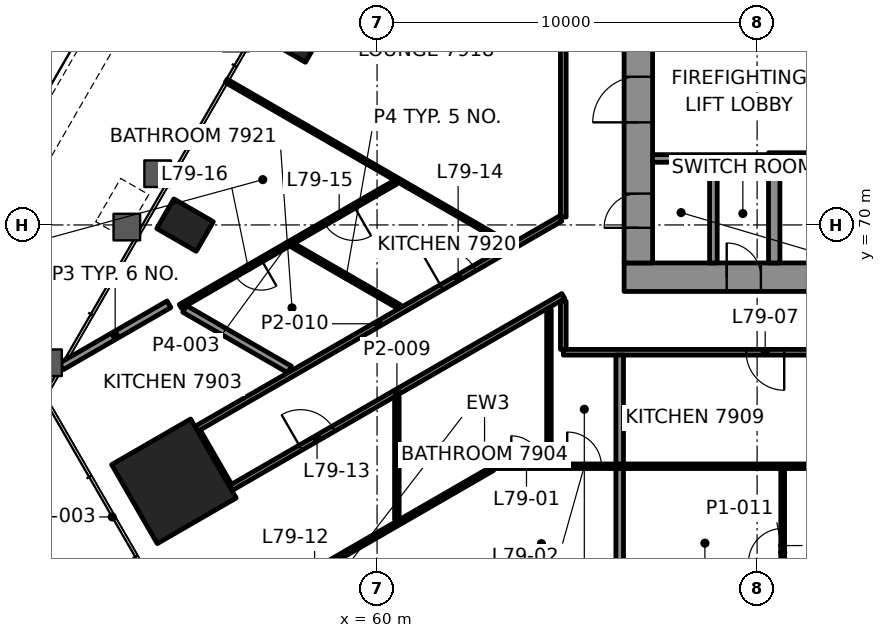
"""IFC4 building model, lengths in metres.
Left out: names, types, materials, properties, quantities, classifications, styles, units other than length and angle.
Written with IfcOpenShell. Run it as: python <this file> out.ifc"""

import sys

from ifc_helpers import new_model, si_unit, direction, frame, frame_2d, origin, origin_2d, place, context, subcontext, project, spatial, rectangle, hollow_rectangle, extrude, element, fill, save


model = new_model("IFC4")
c1 = context("Model", 3, precision=1e-05, world=origin(), true_north=direction((0.0, 1.0)))
c2 = subcontext(c1, "Body", "Model", "MODEL_VIEW")
j1 = project(units=[si_unit("LENGTHUNIT", "METRE"), si_unit("PLANEANGLEUNIT", "RADIAN")], contexts=[c1])
p1 = place(None, origin())
s1 = spatial("IfcSite", under=j1, at=p1, CompositionType="ELEMENT")
p2 = place(p1, origin())
s2 = spatial("IfcBuilding", under=s1, at=p2, CompositionType="ELEMENT")
p3 = place(p2, frame((0.0, 0.0, 323.1)))
s3 = spatial("IfcBuildingStorey", under=s2, at=p3, CompositionType="ELEMENT", Elevation=323.1)
p4 = place(p3, frame((54.655, 63.254, 0.0), z_axis=(0.0, 0.0, 1.0), x_axis=(0.5, -0.866025403784, 0.0)))
e1 = element("IfcColumn", 1, at=p4, inside=s3, PredefinedType="COLUMN", context=c2, shape_type="SweptSolid", body=[
    extrude(rectangle(XDim=2.4, YDim=2.4, at=origin_2d()), origin(), (0.0, 0.0, 1.0), 3.5),
])
for number, where, z_axis, x_axis in (
    (2, (57.819, 74.97, -0.0), (0.0, 0.0, 1.0), (-0.5, -0.866, 0.0)),
    (3, (54.948, 69.996, -0.0), (0.0, 0.0, 1.0), (-0.5, -0.866, 0.0)),
):
    element("IfcColumn", number, at=place(p3, frame(where, z_axis=z_axis, x_axis=x_axis)), inside=s3, PredefinedType="COLUMN", context=c2, shape_type="SweptSolid", body=[
        extrude(hollow_rectangle(XDim=0.9, YDim=1.2, WallThickness=0.06, at=origin_2d()), origin(), (0.0, 0.0, 1.0), 3.5),
    ])
p5 = place(p3, frame((66.5, 68.625, 0.0), z_axis=(0.0, 0.0, 1.0), x_axis=(1.0, 0.0, 0.0)))
e4 = element("IfcWall", 4, at=p5, inside=s3, PredefinedType="SHEAR", context=c2, shape_type="SweptSolid", body=[
    extrude(rectangle(XDim=17.0, YDim=0.75, at=frame_2d((8.5, 0.0))), origin(), (0.0, 0.0, 1.0), 3.2),
])
p6 = place(p5, frame((2.7, 0.0, 0.0)))
e5 = element("IfcOpeningElement", 5, at=p6, cuts=e4, PredefinedType="OPENING", context=c2, shape_type="SweptSolid", body=[
    extrude(rectangle(XDim=0.9, YDim=2.1, at=frame_2d((0.45, 1.05))), frame((0.0, 0.385, 0.0), z_axis=(0.0, -1.0, 0.0), x_axis=(1.0, 0.0, 0.0)), (0.0, 0.0, 1.0), 0.77),
])
p7 = place(p3, frame((66.875, 69.0, 0.0), z_axis=(0.0, 0.0, 1.0), x_axis=(0.0, 1.0, 0.0)))
e6 = element("IfcWall", 6, at=p7, inside=s3, PredefinedType="SHEAR", context=c2, shape_type="SweptSolid", body=[
    extrude(rectangle(XDim=12.0, YDim=0.75, at=frame_2d((6.0, 0.0))), origin(), (0.0, 0.0, 1.0), 3.2),
])
p8 = place(p7, frame((3.7, 0.0, 0.0)))
e7 = element("IfcOpeningElement", 7, at=p8, cuts=e6, PredefinedType="OPENING", context=c2, shape_type="SweptSolid", body=[
    extrude(rectangle(XDim=1.2, YDim=2.1, at=frame_2d((0.6, 1.05))), frame((0.0, 0.385, 0.0), z_axis=(0.0, -1.0, 0.0), x_axis=(1.0, 0.0, 0.0)), (0.0, 0.0, 1.0), 0.77),
])
p9 = place(p7, frame((0.925, 0.0, 0.0)))
e8 = element("IfcOpeningElement", 8, at=p9, cuts=e6, PredefinedType="OPENING", context=c2, shape_type="SweptSolid", body=[
    extrude(rectangle(XDim=0.9, YDim=2.1, at=frame_2d((0.45, 1.05))), frame((0.0, 0.385, 0.0), z_axis=(0.0, -1.0, 0.0), x_axis=(1.0, 0.0, 0.0)), (0.0, 0.0, 1.0), 0.77),
])
p10 = place(p3, frame((70.3, 71.75, 0.0), z_axis=(0.0, 0.0, 1.0), x_axis=(1.0, 0.0, 0.0)))
e9 = element("IfcWall", 9, at=p10, inside=s3, PredefinedType="SHEAR", context=c2, shape_type="SweptSolid", body=[
    extrude(rectangle(XDim=11.5, YDim=0.3, at=frame_2d((5.75, 0.0))), origin(), (0.0, 0.0, 1.0), 3.2),
])
p11 = place(p10, frame((1.0, 0.0, 0.0)))
e10 = element("IfcOpeningElement", 10, at=p11, cuts=e9, PredefinedType="OPENING", context=c2, shape_type="SweptSolid", body=[
    extrude(rectangle(XDim=1.1, YDim=2.1, at=frame_2d((0.55, 1.05))), frame((0.0, 0.16, 0.0), z_axis=(0.0, -1.0, 0.0), x_axis=(1.0, 0.0, 0.0)), (0.0, 0.0, 1.0), 0.32),
])
p12 = place(p10, frame((3.8, 0.0, 0.0)))
e11 = element("IfcOpeningElement", 11, at=p12, cuts=e9, PredefinedType="OPENING", context=c2, shape_type="SweptSolid", body=[
    extrude(rectangle(XDim=1.1, YDim=2.1, at=frame_2d((0.55, 1.05))), frame((0.0, 0.16, 0.0), z_axis=(0.0, -1.0, 0.0), x_axis=(1.0, 0.0, 0.0)), (0.0, 0.0, 1.0), 0.32),
])
p13 = place(p10, frame((6.6, 0.0, 0.0)))
e12 = element("IfcOpeningElement", 12, at=p13, cuts=e9, PredefinedType="OPENING", context=c2, shape_type="SweptSolid", body=[
    extrude(rectangle(XDim=1.1, YDim=2.1, at=frame_2d((0.55, 1.05))), frame((0.0, 0.16, 0.0), z_axis=(0.0, -1.0, 0.0), x_axis=(1.0, 0.0, 0.0)), (0.0, 0.0, 1.0), 0.32),
])
p14 = place(p10, frame((9.4, 0.0, 0.0)))
e13 = element("IfcOpeningElement", 13, at=p14, cuts=e9, PredefinedType="OPENING", context=c2, shape_type="SweptSolid", body=[
    extrude(rectangle(XDim=1.1, YDim=2.1, at=frame_2d((0.55, 1.05))), frame((0.0, 0.16, 0.0), z_axis=(0.0, -1.0, 0.0), x_axis=(1.0, 0.0, 0.0)), (0.0, 0.0, 1.0), 0.32),
])
p15 = place(p3, frame((70.45, 69.0, 0.0), z_axis=(0.0, 0.0, 1.0), x_axis=(0.0, 1.0, 0.0)))
e14 = element("IfcWall", 14, at=p15, inside=s3, PredefinedType="SHEAR", context=c2, shape_type="SweptSolid", body=[
    extrude(rectangle(XDim=2.6, YDim=0.3, at=frame_2d((1.3, 0.0))), origin(), (0.0, 0.0, 1.0), 3.2),
])
p16 = place(p3, frame((63.141, 63.65, 0.0), z_axis=(0.0, 0.0, 1.0), x_axis=(1.0, 0.0, 0.0)))
e15 = element("IfcWall", 15, at=p16, inside=s3, PredefinedType="PARTITIONING", context=c2, shape_type="SweptSolid", body=[
    extrude(rectangle(XDim=18.56, YDim=0.12, at=frame_2d((9.28, 0.0))), origin(), (0.0, 0.0, 1.0), 2.6),
])
p17 = place(p16, frame((0.391, 0.0, 0.0)))
e16 = element("IfcOpeningElement", 16, at=p17, cuts=e15, PredefinedType="OPENING", context=c2, shape_type="SweptSolid", body=[
    extrude(rectangle(XDim=0.8, YDim=2.1, at=frame_2d((0.4, 1.05))), frame((0.0, 0.07, 0.0), z_axis=(0.0, -1.0, 0.0), x_axis=(1.0, 0.0, 0.0)), (0.0, 0.0, 1.0), 0.14),
])
p18 = place(p16, frame((1.862, 0.0, 0.0)))
e17 = element("IfcOpeningElement", 17, at=p18, cuts=e15, PredefinedType="OPENING", context=c2, shape_type="SweptSolid", body=[
    extrude(rectangle(XDim=0.9, YDim=2.1, at=frame_2d((0.45, 1.05))), frame((0.0, 0.07, 0.0), z_axis=(0.0, -1.0, 0.0), x_axis=(1.0, 0.0, 0.0)), (0.0, 0.0, 1.0), 0.14),
])
p19 = place(p16, frame((8.768, 0.0, 0.0)))
e18 = element("IfcOpeningElement", 18, at=p19, cuts=e15, PredefinedType="OPENING", context=c2, shape_type="SweptSolid", body=[
    extrude(rectangle(XDim=0.9, YDim=2.1, at=frame_2d((0.45, 1.05))), frame((0.0, 0.07, 0.0), z_axis=(0.0, -1.0, 0.0), x_axis=(1.0, 0.0, 0.0)), (0.0, 0.0, 1.0), 0.14),
])
p20 = place(p16, frame((12.188, 0.0, 0.0)))
e19 = element("IfcOpeningElement", 19, at=p20, cuts=e15, PredefinedType="OPENING", context=c2, shape_type="SweptSolid", body=[
    extrude(rectangle(XDim=0.8, YDim=2.1, at=frame_2d((0.4, 1.05))), frame((0.0, 0.07, 0.0), z_axis=(0.0, -1.0, 0.0), x_axis=(1.0, 0.0, 0.0)), (0.0, 0.0, 1.0), 0.14),
])
p21 = place(p16, frame((16.514, 0.0, 0.0)))
e20 = element("IfcOpeningElement", 20, at=p21, cuts=e15, PredefinedType="OPENING", context=c2, shape_type="SweptSolid", body=[
    extrude(rectangle(XDim=0.9, YDim=2.1, at=frame_2d((0.45, 1.05))), frame((0.0, 0.07, 0.0), z_axis=(0.0, -1.0, 0.0), x_axis=(1.0, 0.0, 0.0)), (0.0, 0.0, 1.0), 0.14),
])
p22 = place(p3, frame((85.099, 66.65, 0.0), z_axis=(0.0, 0.0, 1.0), x_axis=(-1.0, 0.0, 0.0)))
e21 = element("IfcWall", 21, at=p22, inside=s3, PredefinedType="PARTITIONING", context=c2, shape_type="SweptSolid", body=[
    extrude(rectangle(XDim=20.199, YDim=0.15, at=frame_2d((10.1, 0.0))), origin(), (0.0, 0.0, 1.0), 2.6),
])
p23 = place(p22, frame((1.351, 0.0, 0.0)))
e22 = element("IfcOpeningElement", 22, at=p23, cuts=e21, PredefinedType="OPENING", context=c2, shape_type="SweptSolid", body=[
    extrude(rectangle(XDim=0.9, YDim=2.1, at=frame_2d((0.45, 1.05))), frame((0.0, 0.085, 0.0), z_axis=(0.0, -1.0, 0.0), x_axis=(1.0, 0.0, 0.0)), (0.0, 0.0, 1.0), 0.17),
])
p24 = place(p22, frame((14.386, 0.0, 0.0)))
e23 = element("IfcOpeningElement", 23, at=p24, cuts=e21, PredefinedType="OPENING", context=c2, shape_type="SweptSolid", body=[
    extrude(rectangle(XDim=1.0, YDim=2.1, at=frame_2d((0.5, 1.05))), frame((0.0, 0.085, 0.0), z_axis=(0.0, -1.0, 0.0), x_axis=(1.0, 0.0, 0.0)), (0.0, 0.0, 1.0), 0.17),
])
p25 = place(p3, frame((63.037, 63.59, 0.0), z_axis=(0.0, 0.0, 1.0), x_axis=(-0.866029008523, -0.499993756358, 0.0)))
e24 = element("IfcWall", 24, at=p25, inside=s3, PredefinedType="PARTITIONING", context=c2, shape_type="SweptSolid", body=[
    extrude(rectangle(XDim=8.828, YDim=0.12, at=frame_2d((4.414, 0.0))), origin(), (0.0, 0.0, 1.0), 2.6),
])
p26 = place(p25, frame((4.955, 0.0, 0.0)))
e25 = element("IfcOpeningElement", 25, at=p26, cuts=e24, PredefinedType="OPENING", context=c2, shape_type="SweptSolid", body=[
    extrude(rectangle(XDim=0.9, YDim=2.1, at=frame_2d((0.45, 1.05))), frame((0.0, 0.07, 0.0), z_axis=(0.0, -1.0, 0.0), x_axis=(1.0, 0.0, 0.0)), (0.0, 0.0, 1.0), 0.14),
])
p27 = place(p3, frame((56.145, 63.075, 0.0), z_axis=(0.0, 0.0, 1.0), x_axis=(0.866024727794, 0.500001170848, 0.0)))
e26 = element("IfcWall", 26, at=p27, inside=s3, PredefinedType="PARTITIONING", context=c2, shape_type="SweptSolid", body=[
    extrude(rectangle(XDim=10.11, YDim=0.15, at=frame_2d((5.055, 0.0))), origin(), (0.0, 0.0, 1.0), 2.597),
])
p28 = place(p27, frame((2.128, 0.0, 0.0)))
e27 = element("IfcOpeningElement", 27, at=p28, cuts=e26, PredefinedType="OPENING", context=c2, shape_type="SweptSolid", body=[
    extrude(rectangle(XDim=1.0, YDim=2.1, at=frame_2d((0.5, 1.05))), frame((0.0, 0.085, 0.0), z_axis=(0.0, -1.0, 0.0), x_axis=(1.0, 0.0, 0.0)), (0.0, 0.0, 1.0), 0.17),
])
p29 = place(p3, frame((55.244, 64.634, 0.0), z_axis=(0.0, 0.0, 1.0), x_axis=(0.866029028053, 0.499993722531, 0.0)))
e28 = element("IfcWall", 28, at=p29, inside=s3, PredefinedType="PARTITIONING", context=c2, shape_type="SweptSolid", body=[
    extrude(rectangle(XDim=11.063, YDim=0.15, at=frame_2d((5.531, 0.0))), origin(), (0.0, 0.0, 1.0), 2.6),
])
p30 = place(p29, frame((7.454, 0.0, 0.0)))
e29 = element("IfcOpeningElement", 29, at=p30, cuts=e28, PredefinedType="OPENING", context=c2, shape_type="SweptSolid", body=[
    extrude(rectangle(XDim=1.0, YDim=2.1, at=frame_2d((0.5, 1.05))), frame((0.0, 0.085, 0.0), z_axis=(0.0, -1.0, 0.0), x_axis=(1.0, 0.0, 0.0)), (0.0, 0.0, 1.0), 0.17),
])
p31 = place(p3, frame((60.485, 71.123, 0.0), z_axis=(0.0, 0.0, 1.0), x_axis=(-0.866018230694, -0.500012423951, 0.0)))
e30 = element("IfcWall", 30, at=p31, inside=s3, PredefinedType="PARTITIONING", context=c2, shape_type="SweptSolid", body=[
    extrude(rectangle(XDim=6.535, YDim=0.12, at=frame_2d((3.268, 0.0))), origin(), (0.0, 0.0, 1.0), 2.6),
])
p32 = place(p31, frame((1.261, 0.0, 0.0)))
e31 = element("IfcOpeningElement", 31, at=p32, cuts=e30, PredefinedType="OPENING", context=c2, shape_type="SweptSolid", body=[
    extrude(rectangle(XDim=0.9, YDim=2.1, at=frame_2d((0.45, 1.05))), frame((0.0, 0.07, 0.0), z_axis=(0.0, -1.0, 0.0), x_axis=(1.0, 0.0, 0.0)), (0.0, 0.0, 1.0), 0.14),
])
p33 = place(p31, frame((4.077, 0.0, 0.0)))
e32 = element("IfcOpeningElement", 32, at=p33, cuts=e30, PredefinedType="OPENING", context=c2, shape_type="SweptSolid", body=[
    extrude(rectangle(XDim=0.8, YDim=2.1, at=frame_2d((0.4, 1.05))), frame((0.0, 0.07, 0.0), z_axis=(0.0, -1.0, 0.0), x_axis=(1.0, 0.0, 0.0)), (0.0, 0.0, 1.0), 0.14),
])
p34 = place(p3, frame((51.692, 66.278, 0.0), z_axis=(0.0, 0.0, 1.0), x_axis=(0.866020247087, 0.500008931556, 0.0)))
e33 = element("IfcWall", 33, at=p34, inside=s3, PredefinedType="PARTITIONING", context=c2, shape_type="SweptSolid", body=[
    extrude(rectangle(XDim=3.271, YDim=0.2, at=frame_2d((1.635, 0.0))), origin(), (0.0, 0.0, 1.0), 2.6),
])
p35 = place(p3, frame((70.673, 59.176, 0.0), z_axis=(0.0, 0.0, 1.0), x_axis=(0.0, 1.0, 0.0)))
e34 = element("IfcWall", 34, at=p35, inside=s3, PredefinedType="PARTITIONING", context=c2, shape_type="SweptSolid", body=[
    extrude(rectangle(XDim=4.414, YDim=0.1, at=frame_2d((2.207, 0.0))), origin(), (0.0, 0.0, 1.0), 2.588),
])
p36 = place(p35, frame((1.937, 0.0, 0.0)))
e35 = element("IfcOpeningElement", 35, at=p36, cuts=e34, PredefinedType="OPENING", context=c2, shape_type="SweptSolid", body=[
    extrude(rectangle(XDim=0.9, YDim=2.1, at=frame_2d((0.45, 1.05))), frame((0.0, 0.06, 0.0), z_axis=(0.0, -1.0, 0.0), x_axis=(1.0, 0.0, 0.0)), (0.0, 0.0, 1.0), 0.12),
])
p37 = place(p3, frame((66.384, 60.736, 0.0), z_axis=(0.0, 0.0, 1.0), x_axis=(0.0, 1.0, 0.0)))
e36 = element("IfcWall", 36, at=p37, inside=s3, PredefinedType="PARTITIONING", context=c2, shape_type="SweptSolid", body=[
    extrude(rectangle(XDim=2.854, YDim=0.2, at=frame_2d((1.427, 0.0))), origin(), (0.0, 0.0, 1.0), 2.6),
])
p38 = place(p3, frame((64.9, 66.725, 0.0), z_axis=(0.0, 0.0, 1.0), x_axis=(0.0, 1.0, 0.0)))
e37 = element("IfcWall", 37, at=p38, inside=s3, PredefinedType="PARTITIONING", context=c2, shape_type="SweptSolid", body=[
    extrude(rectangle(XDim=1.268, YDim=0.15, at=frame_2d((0.634, 0.0))), origin(), (0.0, 0.0, 1.0), 2.597),
])
p39 = place(p3, frame((64.9, 70.208, 0.0), z_axis=(0.0, 0.0, 1.0), x_axis=(0.0, 1.0, 0.0)))
e38 = element("IfcWall", 38, at=p39, inside=s3, PredefinedType="PARTITIONING", context=c2, shape_type="SweptSolid", body=[
    extrude(rectangle(XDim=13.141, YDim=0.15, at=frame_2d((6.571, 0.0))), origin(), (0.0, 0.0, 1.0), 2.6),
])
p40 = place(p3, frame((64.523, 63.71, 0.0), z_axis=(0.0, 0.0, 1.0), x_axis=(0.0, 1.0, 0.0)))
e39 = element("IfcWall", 39, at=p40, inside=s3, PredefinedType="PARTITIONING", context=c2, shape_type="SweptSolid", body=[
    extrude(rectangle(XDim=4.075, YDim=0.12, at=frame_2d((2.038, 0.0))), origin(), (0.0, 0.0, 1.0), 2.597),
])
p41 = place(p3, frame((60.521, 62.247, 0.0), z_axis=(0.0, 0.0, 1.0), x_axis=(0.0, 1.0, 0.0)))
e40 = element("IfcWall", 40, at=p41, inside=s3, PredefinedType="PARTITIONING", context=c2, shape_type="SweptSolid", body=[
    extrude(rectangle(XDim=3.228, YDim=0.12, at=frame_2d((1.614, 0.0))), origin(), (0.0, 0.0, 1.0), 2.6),
])
p42 = place(p3, frame((56.106, 63.139, 0.0), z_axis=(0.0, 0.0, 1.0), x_axis=(-0.499944585209, 0.866057395165, 0.0)))
e41 = element("IfcWall", 41, at=p42, inside=s3, PredefinedType="PARTITIONING", context=c2, shape_type="SweptSolid", body=[
    extrude(rectangle(XDim=1.649, YDim=0.15, at=frame_2d((0.825, 0.0))), origin(), (0.0, 0.0, 1.0), 2.597),
])
p43 = place(p3, frame((63.468, 69.498, 0.0), z_axis=(0.0, 0.0, 1.0), x_axis=(-0.866025107759, 0.500000512732, 0.0)))
e42 = element("IfcWall", 42, at=p43, inside=s3, PredefinedType="PARTITIONING", context=c2, shape_type="SweptSolid", body=[
    extrude(rectangle(XDim=8.588, YDim=0.1, at=frame_2d((4.294, 0.0))), origin(), (0.0, 0.0, 1.0), 2.6),
])
p44 = place(p3, frame((60.588, 67.845, 0.0), z_axis=(0.0, 0.0, 1.0), x_axis=(-0.86605210011, 0.499953757757, 0.0)))
e43 = element("IfcWall", 43, at=p44, inside=s3, PredefinedType="PARTITIONING", context=c2, shape_type="SweptSolid", body=[
    extrude(rectangle(XDim=3.228, YDim=0.12, at=frame_2d((1.614, 0.0))), origin(), (0.0, 0.0, 1.0), 2.6),
])
p45 = place(p3, frame((57.698, 66.197, 0.0), z_axis=(0.0, 0.0, 1.0), x_axis=(-0.866019818373, 0.500009674092, 0.0)))
e44 = element("IfcWall", 44, at=p45, inside=s3, PredefinedType="PARTITIONING", context=c2, shape_type="SweptSolid", body=[
    extrude(rectangle(XDim=3.188, YDim=0.2, at=frame_2d((1.594, 0.0))), origin(), (0.0, 0.0, 1.0), 2.6),
])
p46 = place(p3, frame((66.384, 63.71, 0.0), z_axis=(0.0, 0.0, 1.0), x_axis=(0.0, 1.0, 0.0)))
e45 = element("IfcWall", 45, at=p46, inside=s3, PredefinedType="PARTITIONING", context=c2, shape_type="SweptSolid", body=[
    extrude(rectangle(XDim=2.865, YDim=0.2, at=frame_2d((1.433, 0.0))), origin(), (0.0, 0.0, 1.0), 2.6),
])
p47 = place(p3, frame((69.117, 103.238, 0.0), z_axis=(0.0, 0.0, 1.0), x_axis=(-0.500001437611, -0.866024573778, 0.0)))
e46 = element("IfcWall", 46, at=p47, inside=s3, PredefinedType="SOLIDWALL", context=c2, shape_type="SweptSolid", body=[
    extrude(rectangle(XDim=43.027, YDim=0.8, at=frame_2d((21.513, 0.0))), origin(), (0.0, 0.0, 1.0), 0.9),
])
p48 = place(p3, frame((47.604, 64.967, 0.0), z_axis=(0.0, 0.0, 1.0), x_axis=(0.49999175339, -0.866030164915, 0.0)))
e47 = element("IfcWall", 47, at=p48, inside=s3, PredefinedType="SOLIDWALL", context=c2, shape_type="SweptSolid", body=[
    extrude(rectangle(XDim=10.019, YDim=0.8, at=frame_2d((5.009, 0.0))), origin(), (0.0, 0.0, 1.0), 0.9),
])
p49 = place(p3, frame((67.25, 71.75, 0.0), z_axis=(0.0, 0.0, 1.0), x_axis=(1.0, 0.0, 0.0)))
e48 = element("IfcWall", 48, at=p49, inside=s3, PredefinedType="PARTITIONING", context=c2, shape_type="SweptSolid", body=[
    extrude(rectangle(XDim=3.05, YDim=0.2, at=frame_2d((1.525, 0.0))), origin(), (0.0, 0.0, 1.0), 3.2),
])
p50 = place(p3, frame((68.85, 69.0, 0.0), z_axis=(0.0, 0.0, 1.0), x_axis=(0.0, 1.0, 0.0)))
e49 = element("IfcWall", 49, at=p50, inside=s3, PredefinedType="PARTITIONING", context=c2, shape_type="SweptSolid", body=[
    extrude(rectangle(XDim=2.65, YDim=0.2, at=frame_2d((1.325, 0.0))), origin(), (0.0, 0.0, 1.0), 3.2),
])
p51 = place(p17, origin())
e50 = element("IfcDoor", 50, at=p51, inside=s3, OperationType="SINGLE_SWING_RIGHT", PredefinedType="DOOR", context=c2, shape_type="SweptSolid", body=[
    extrude(rectangle(XDim=0.8, YDim=2.1, at=frame_2d((0.4, 1.05))), frame((0.0, 0.025, 0.0), z_axis=(0.0, -1.0, 0.0), x_axis=(1.0, 0.0, 0.0)), (0.0, 0.0, 1.0), 0.05),
])
fill(e16, e50)
p52 = place(p18, origin())
e51 = element("IfcDoor", 51, at=p52, inside=s3, OperationType="SINGLE_SWING_LEFT", PredefinedType="DOOR", context=c2, shape_type="SweptSolid", body=[
    extrude(rectangle(XDim=0.9, YDim=2.1, at=frame_2d((0.45, 1.05))), frame((0.0, 0.025, 0.0), z_axis=(0.0, -1.0, 0.0), x_axis=(1.0, 0.0, 0.0)), (0.0, 0.0, 1.0), 0.05),
])
fill(e17, e51)
p53 = place(p24, origin())
e52 = element("IfcDoor", 52, at=p53, inside=s3, OperationType="SINGLE_SWING_RIGHT", PredefinedType="DOOR", context=c2, shape_type="SweptSolid", body=[
    extrude(rectangle(XDim=1.0, YDim=2.1, at=frame_2d((0.5, 1.05))), frame((0.0, 0.025, 0.0), z_axis=(0.0, -1.0, 0.0), x_axis=(1.0, 0.0, 0.0)), (0.0, 0.0, 1.0), 0.05),
])
fill(e23, e52)
p54 = place(p28, origin())
e53 = element("IfcDoor", 53, at=p54, inside=s3, OperationType="SINGLE_SWING_LEFT", PredefinedType="DOOR", context=c2, shape_type="SweptSolid", body=[
    extrude(rectangle(XDim=1.0, YDim=2.1, at=frame_2d((0.5, 1.05))), frame((0.0, 0.025, 0.0), z_axis=(0.0, -1.0, 0.0), x_axis=(1.0, 0.0, 0.0)), (0.0, 0.0, 1.0), 0.05),
])
fill(e27, e53)
p55 = place(p30, origin())
e54 = element("IfcDoor", 54, at=p55, inside=s3, OperationType="SINGLE_SWING_LEFT", PredefinedType="DOOR", context=c2, shape_type="SweptSolid", body=[
    extrude(rectangle(XDim=1.0, YDim=2.1, at=frame_2d((0.5, 1.05))), frame((0.0, 0.025, 0.0), z_axis=(0.0, -1.0, 0.0), x_axis=(1.0, 0.0, 0.0)), (0.0, 0.0, 1.0), 0.05),
])
fill(e29, e54)
p56 = place(p32, origin())
e55 = element("IfcDoor", 55, at=p56, inside=s3, OperationType="SINGLE_SWING_LEFT", PredefinedType="DOOR", context=c2, shape_type="SweptSolid", body=[
    extrude(rectangle(XDim=0.9, YDim=2.1, at=frame_2d((0.45, 1.05))), frame((0.0, 0.025, 0.0), z_axis=(0.0, -1.0, 0.0), x_axis=(1.0, 0.0, 0.0)), (0.0, 0.0, 1.0), 0.05),
])
fill(e31, e55)
p57 = place(p33, origin())
e56 = element("IfcDoor", 56, at=p57, inside=s3, OperationType="SINGLE_SWING_LEFT", PredefinedType="DOOR", context=c2, shape_type="SweptSolid", body=[
    extrude(rectangle(XDim=0.8, YDim=2.1, at=frame_2d((0.4, 1.05))), frame((0.0, 0.025, 0.0), z_axis=(0.0, -1.0, 0.0), x_axis=(1.0, 0.0, 0.0)), (0.0, 0.0, 1.0), 0.05),
])
fill(e32, e56)
p58 = place(p36, origin())
e57 = element("IfcDoor", 57, at=p58, inside=s3, OperationType="SINGLE_SWING_LEFT", PredefinedType="DOOR", context=c2, shape_type="SweptSolid", body=[
    extrude(rectangle(XDim=0.9, YDim=2.1, at=frame_2d((0.45, 1.05))), frame((0.0, 0.025, 0.0), z_axis=(0.0, -1.0, 0.0), x_axis=(1.0, 0.0, 0.0)), (0.0, 0.0, 1.0), 0.05),
])
fill(e35, e57)
p59 = place(p8, origin())
e58 = element("IfcDoor", 58, at=p59, inside=s3, OperationType="SINGLE_SWING_RIGHT", PredefinedType="DOOR", context=c2, shape_type="SweptSolid", body=[
    extrude(rectangle(XDim=1.2, YDim=2.1, at=frame_2d((0.6, 1.05))), frame((0.0, 0.095, 0.0), z_axis=(0.0, -1.0, 0.0), x_axis=(1.0, 0.0, 0.0)), (0.0, 0.0, 1.0), 0.19),
])
fill(e7, e58)
p60 = place(p9, origin())
e59 = element("IfcDoor", 59, at=p60, inside=s3, OperationType="SINGLE_SWING_RIGHT", PredefinedType="DOOR", context=c2, shape_type="SweptSolid", body=[
    extrude(rectangle(XDim=0.9, YDim=2.1, at=frame_2d((0.45, 1.05))), frame((0.0, 0.095, 0.0), z_axis=(0.0, -1.0, 0.0), x_axis=(1.0, 0.0, 0.0)), (0.0, 0.0, 1.0), 0.19),
])
fill(e8, e59)
p61 = place(p6, origin())
e60 = element("IfcDoor", 60, at=p61, inside=s3, OperationType="SINGLE_SWING_LEFT", PredefinedType="DOOR", context=c2, shape_type="SweptSolid", body=[
    extrude(rectangle(XDim=0.9, YDim=2.1, at=frame_2d((0.45, 1.05))), frame((0.0, 0.095, 0.0), z_axis=(0.0, -1.0, 0.0), x_axis=(1.0, 0.0, 0.0)), (0.0, 0.0, 1.0), 0.19),
])
fill(e5, e60)
save(model, sys.argv[1])
